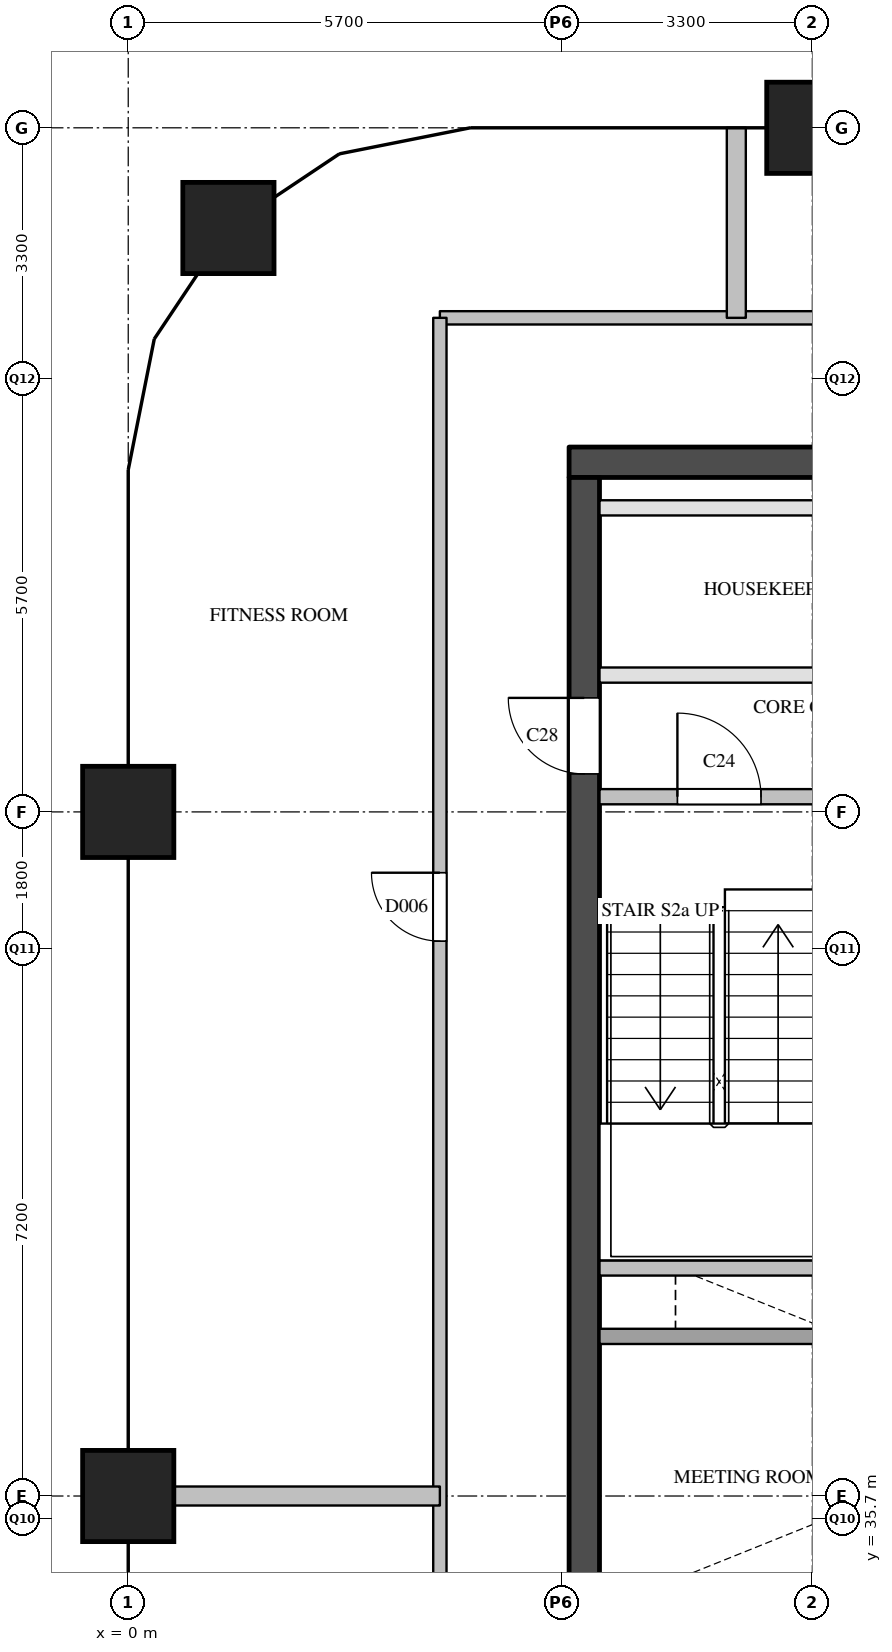
"""IFC4 building model, lengths in metres.
Left out: names, types, materials, properties, quantities, classifications, styles, units other than length and angle.
Written with IfcOpenShell. Run it as: python <this file> out.ifc"""

import sys

from ifc_helpers import new_model, si_unit, direction, frame, frame_2d, origin, origin_2d, place, context, subcontext, project, spatial, rectangle, extrude, element, fill, save


model = new_model("IFC4")
c1 = context("Model", 3, precision=1e-05, world=origin(), true_north=direction((0.0, 1.0)))
c2 = subcontext(c1, "Body", "Model", "MODEL_VIEW")
j1 = project(units=[si_unit("LENGTHUNIT", "METRE"), si_unit("PLANEANGLEUNIT", "RADIAN")], contexts=[c1])
p1 = place(None, origin())
s1 = spatial("IfcSite", under=j1, at=p1, CompositionType="ELEMENT")
p2 = place(p1, origin())
s2 = spatial("IfcBuilding", under=s1, at=p2, CompositionType="ELEMENT")
p3 = place(p2, frame((0.0, 0.0, 211.1)))
s3 = spatial("IfcBuildingStorey", under=s2, at=p3, CompositionType="ELEMENT", Elevation=211.1)
for number, where, z_axis, x_axis in (
    (1, (0.0, 36.0, 0.0), (0.0, 0.0, 1.0), (1.0, 0.0, 0.0)),
    (2, (0.0, 45.0, 0.0), (0.0, 0.0, 1.0), (1.0, 0.0, 0.0)),
    (3, (1.318, 52.682, 0.0), (0.0, 0.0, 1.0), (1.0, 0.0, 0.0)),
    (4, (9.0, 54.0, 0.0), (0.0, 0.0, 1.0), (1.0, 0.0, 0.0)),
):
    element("IfcColumn", number, at=place(p3, frame(where, z_axis=z_axis, x_axis=x_axis)), inside=s3, PredefinedType="COLUMN", context=c2, shape_type="SweptSolid", body=[
        extrude(rectangle(XDim=1.2, YDim=1.2, at=origin_2d()), origin(), (0.0, 0.0, 1.0), 3.9),
    ])
p4 = place(p3, frame((5.8, 49.6, 0.0), z_axis=(0.0, 0.0, 1.0), x_axis=(1.0, 0.0, 0.0)))
e5 = element("IfcWall", 5, at=p4, inside=s3, PredefinedType="SHEAR", context=c2, shape_type="SweptSolid", body=[
    extrude(rectangle(XDim=12.0, YDim=0.4, at=frame_2d((6.0, 0.0))), origin(), (0.0, 0.0, 1.0), 3.6),
])
p5 = place(p3, frame((6.0, 29.1, 0.0), z_axis=(0.0, 0.0, 1.0), x_axis=(0.0, 1.0, 0.0)))
e6 = element("IfcWall", 6, at=p5, inside=s3, PredefinedType="SHEAR", context=c2, shape_type="SweptSolid", body=[
    extrude(rectangle(XDim=20.3, YDim=0.4, at=frame_2d((10.15, 0.0))), origin(), (0.0, 0.0, 1.0), 3.6),
])
p6 = place(p5, frame((3.45, 0.0, 0.0)))
e7 = element("IfcOpeningElement", 7, at=p6, cuts=e6, PredefinedType="OPENING", context=c2, shape_type="SweptSolid", body=[
    extrude(rectangle(XDim=1.0, YDim=2.1, at=frame_2d((0.5, 1.05))), frame((0.0, 0.21, 0.0), z_axis=(0.0, -1.0, 0.0), x_axis=(1.0, 0.0, 0.0)), (0.0, 0.0, 1.0), 0.42),
])
p7 = place(p5, frame((16.4, 0.0, 0.0)))
e8 = element("IfcOpeningElement", 8, at=p7, cuts=e6, PredefinedType="OPENING", context=c2, shape_type="SweptSolid", body=[
    extrude(rectangle(XDim=1.0, YDim=2.1, at=frame_2d((0.5, 1.05))), frame((0.0, 0.21, 0.0), z_axis=(0.0, -1.0, 0.0), x_axis=(1.0, 0.0, 0.0)), (0.0, 0.0, 1.0), 0.42),
])
p8 = place(p3, frame((6.2, 38.1, 0.0), z_axis=(0.0, 0.0, 1.0), x_axis=(1.0, 0.0, 0.0)))
e9 = element("IfcWall", 9, at=p8, inside=s3, PredefinedType="SOLIDWALL", context=c2, shape_type="SweptSolid", body=[
    extrude(rectangle(XDim=11.2, YDim=0.2, at=frame_2d((5.6, 0.0))), origin(), (0.0, 0.0, 1.0), 3.6),
])
p9 = place(p8, frame((8.85, 0.0, 0.0)))
e10 = element("IfcOpeningElement", 10, at=p9, cuts=e9, PredefinedType="OPENING", context=c2, shape_type="SweptSolid", body=[
    extrude(rectangle(XDim=1.2, YDim=2.1, at=frame_2d((0.6, 1.05))), frame((0.0, 0.11, 0.0), z_axis=(0.0, -1.0, 0.0), x_axis=(1.0, 0.0, 0.0)), (0.0, 0.0, 1.0), 0.22),
])
p10 = place(p3, frame((6.2, 39.0, 0.0), z_axis=(0.0, 0.0, 1.0), x_axis=(1.0, 0.0, 0.0)))
e11 = element("IfcWall", 11, at=p10, inside=s3, PredefinedType="SOLIDWALL", context=c2, shape_type="SweptSolid", body=[
    extrude(rectangle(XDim=3.05, YDim=0.2, at=frame_2d((1.525, 0.0))), origin(), (0.0, 0.0, 1.0), 3.6),
])
p11 = place(p3, frame((6.2, 45.2, 0.0), z_axis=(0.0, 0.0, 1.0), x_axis=(1.0, 0.0, 0.0)))
e12 = element("IfcWall", 12, at=p11, inside=s3, PredefinedType="SOLIDWALL", context=c2, shape_type="SweptSolid", body=[
    extrude(rectangle(XDim=6.3, YDim=0.2, at=frame_2d((3.15, 0.0))), origin(), (0.0, 0.0, 1.0), 3.6),
])
p12 = place(p11, frame((1.025, 0.0, 0.0)))
e13 = element("IfcOpeningElement", 13, at=p12, cuts=e12, PredefinedType="OPENING", context=c2, shape_type="SweptSolid", body=[
    extrude(rectangle(XDim=1.1, YDim=2.1, at=frame_2d((0.55, 1.05))), frame((0.0, 0.11, 0.0), z_axis=(0.0, -1.0, 0.0), x_axis=(1.0, 0.0, 0.0)), (0.0, 0.0, 1.0), 0.22),
])
p13 = place(p11, frame((4.175, 0.0, 0.0)))
e14 = element("IfcOpeningElement", 14, at=p13, cuts=e12, PredefinedType="OPENING", context=c2, shape_type="SweptSolid", body=[
    extrude(rectangle(XDim=1.1, YDim=2.1, at=frame_2d((0.55, 1.05))), frame((0.0, 0.11, 0.0), z_axis=(0.0, -1.0, 0.0), x_axis=(1.0, 0.0, 0.0)), (0.0, 0.0, 1.0), 0.22),
])
p14 = place(p3, frame((6.2, 46.8, 0.0), z_axis=(0.0, 0.0, 1.0), x_axis=(1.0, 0.0, 0.0)))
e15 = element("IfcWall", 15, at=p14, inside=s3, PredefinedType="PARTITIONING", context=c2, shape_type="SweptSolid", body=[
    extrude(rectangle(XDim=11.2, YDim=0.2, at=frame_2d((5.6, 0.0))), origin(), (0.0, 0.0, 1.0), 3.6),
])
p15 = place(p14, frame((5.15, 0.0, 0.0)))
e16 = element("IfcOpeningElement", 16, at=p15, cuts=e15, PredefinedType="OPENING", context=c2, shape_type="SweptSolid", body=[
    extrude(rectangle(XDim=0.9, YDim=2.1, at=frame_2d((0.45, 1.05))), frame((0.0, 0.11, 0.0), z_axis=(0.0, -1.0, 0.0), x_axis=(1.0, 0.0, 0.0)), (0.0, 0.0, 1.0), 0.22),
])
p16 = place(p3, frame((6.2, 49.0, 0.0), z_axis=(0.0, 0.0, 1.0), x_axis=(1.0, 0.0, 0.0)))
e17 = element("IfcWall", 17, at=p16, inside=s3, PredefinedType="PARTITIONING", context=c2, shape_type="SweptSolid", body=[
    extrude(rectangle(XDim=11.2, YDim=0.2, at=frame_2d((5.6, 0.0))), origin(), (0.0, 0.0, 1.0), 3.6),
])
p17 = place(p3, frame((4.1, 51.5, 0.0), z_axis=(0.0, 0.0, 1.0), x_axis=(1.0, 0.0, 0.0)))
e18 = element("IfcWall", 18, at=p17, inside=s3, PredefinedType="PARTITIONING", context=c2, shape_type="SweptSolid", body=[
    extrude(rectangle(XDim=15.4, YDim=0.175, at=frame_2d((7.7, 0.0))), origin(), (0.0, 0.0, 1.0), 3.6),
])
p18 = place(p17, frame((8.149, 0.0, 0.0)))
e19 = element("IfcOpeningElement", 19, at=p18, cuts=e18, PredefinedType="OPENING", context=c2, shape_type="SweptSolid", body=[
    extrude(rectangle(XDim=1.0, YDim=2.1, at=frame_2d((0.5, 1.05))), frame((0.0, 0.097, 0.0), z_axis=(0.0, -1.0, 0.0), x_axis=(1.0, 0.0, 0.0)), (0.0, 0.0, 1.0), 0.195),
])
p19 = place(p3, frame((4.1, 28.5, 0.0), z_axis=(0.0, 0.0, 1.0), x_axis=(0.0, 1.0, 0.0)))
e20 = element("IfcWall", 20, at=p19, inside=s3, PredefinedType="PARTITIONING", context=c2, shape_type="SweptSolid", body=[
    extrude(rectangle(XDim=23.0, YDim=0.175, at=frame_2d((11.5, 0.0))), origin(), (0.0, 0.0, 1.0), 3.6),
])
p20 = place(p19, frame((3.3, 0.0, 0.0)))
e21 = element("IfcOpeningElement", 21, at=p20, cuts=e20, PredefinedType="OPENING", context=c2, shape_type="SweptSolid", body=[
    extrude(rectangle(XDim=0.9, YDim=2.1, at=frame_2d((0.45, 1.05))), frame((0.0, 0.097, 0.0), z_axis=(0.0, -1.0, 0.0), x_axis=(1.0, 0.0, 0.0)), (0.0, 0.0, 1.0), 0.195),
])
p21 = place(p19, frame((14.8, 0.0, 0.0)))
e22 = element("IfcOpeningElement", 22, at=p21, cuts=e20, PredefinedType="OPENING", context=c2, shape_type="SweptSolid", body=[
    extrude(rectangle(XDim=0.9, YDim=2.1, at=frame_2d((0.45, 1.05))), frame((0.0, 0.097, 0.0), z_axis=(0.0, -1.0, 0.0), x_axis=(1.0, 0.0, 0.0)), (0.0, 0.0, 1.0), 0.195),
])
p22 = place(p3, frame((0.0, 36.0, 0.0), z_axis=(0.0, 0.0, 1.0), x_axis=(1.0, 0.0, 0.0)))
e23 = element("IfcWall", 23, at=p22, inside=s3, PredefinedType="PARTITIONING", context=c2, shape_type="SweptSolid", body=[
    extrude(rectangle(XDim=4.1, YDim=0.25, at=frame_2d((2.05, 0.0))), origin(), (0.0, 0.0, 1.0), 3.6),
])
p23 = place(p3, frame((8.0, 51.5, 0.0), z_axis=(0.0, 0.0, 1.0), x_axis=(0.0, 1.0, 0.0)))
e24 = element("IfcWall", 24, at=p23, inside=s3, PredefinedType="PARTITIONING", context=c2, shape_type="SweptSolid", body=[
    extrude(rectangle(XDim=2.5, YDim=0.25, at=frame_2d((1.25, 0.0))), origin(), (0.0, 0.0, 1.0), 2.6),
])
p24 = place(p12, origin())
e25 = element("IfcDoor", 25, at=p24, inside=s3, OperationType="SINGLE_SWING_LEFT", PredefinedType="DOOR", context=c2, shape_type="SweptSolid", body=[
    extrude(rectangle(XDim=1.1, YDim=2.1, at=frame_2d((0.55, 1.05))), frame((0.0, 0.025, 0.0), z_axis=(0.0, -1.0, 0.0), x_axis=(1.0, 0.0, 0.0)), (0.0, 0.0, 1.0), 0.05),
])
fill(e13, e25)
p25 = place(p7, origin())
e26 = element("IfcDoor", 26, at=p25, inside=s3, OperationType="SINGLE_SWING_RIGHT", PredefinedType="DOOR", context=c2, shape_type="SweptSolid", body=[
    extrude(rectangle(XDim=1.0, YDim=2.1, at=frame_2d((0.5, 1.05))), frame((0.0, 0.025, 0.0), z_axis=(0.0, -1.0, 0.0), x_axis=(1.0, 0.0, 0.0)), (0.0, 0.0, 1.0), 0.05),
])
fill(e8, e26)
p26 = place(p21, origin())
e27 = element("IfcDoor", 27, at=p26, inside=s3, OperationType="SINGLE_SWING_RIGHT", PredefinedType="DOOR", context=c2, shape_type="SweptSolid", body=[
    extrude(rectangle(XDim=0.9, YDim=2.1, at=frame_2d((0.45, 1.05))), frame((0.0, 0.025, 0.0), z_axis=(0.0, -1.0, 0.0), x_axis=(1.0, 0.0, 0.0)), (0.0, 0.0, 1.0), 0.05),
])
fill(e22, e27)
save(model, sys.argv[1])
